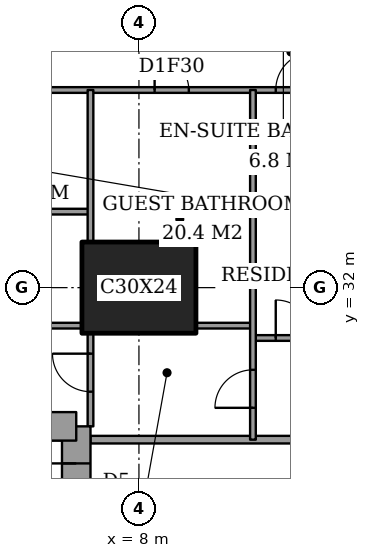
"""IFC4 building model, lengths in metres.
Left out: names, types, materials, properties, quantities, classifications, styles, units other than length and angle.
Written with IfcOpenShell. Run it as: python <this file> out.ifc"""

import sys

from ifc_helpers import new_model, si_unit, direction, frame, frame_2d, origin, origin_2d, place, context, subcontext, project, spatial, rectangle, extrude, element, fill, save


model = new_model("IFC4")
c1 = context("Model", 3, precision=1e-05, world=origin(), true_north=direction((0.0, 1.0)))
c2 = subcontext(c1, "Body", "Model", "MODEL_VIEW")
j1 = project(units=[si_unit("LENGTHUNIT", "METRE"), si_unit("PLANEANGLEUNIT", "RADIAN")], contexts=[c1])
p1 = place(None, origin())
s1 = spatial("IfcSite", under=j1, at=p1, CompositionType="ELEMENT")
p2 = place(p1, origin())
s2 = spatial("IfcBuilding", under=s1, at=p2, CompositionType="ELEMENT")
p3 = place(p2, frame((0.0, 0.0, 128.6)))
s3 = spatial("IfcBuildingStorey", under=s2, at=p3, CompositionType="ELEMENT", Elevation=128.6)
p4 = place(p3, frame((8.0, 32.0, 0.0), z_axis=(0.0, 0.0, 1.0), x_axis=(1.0, 0.0, 0.0)))
e1 = element("IfcColumn", 1, at=p4, inside=s3, PredefinedType="COLUMN", context=c2, shape_type="SweptSolid", body=[
    extrude(rectangle(XDim=3.0, YDim=2.4, at=origin_2d()), origin(), (0.0, 0.0, 1.0), 3.6),
])
p5 = place(p3, frame((6.35, 19.65, 0.0), z_axis=(0.0, 0.0, 1.0), x_axis=(0.0, 1.0, 0.0)))
e2 = element("IfcWall", 2, at=p5, inside=s3, PredefinedType="SHEAR", context=c2, shape_type="SweptSolid", body=[
    extrude(rectangle(XDim=8.7, YDim=0.75, at=frame_2d((4.35, 0.0))), origin(), (0.0, 0.0, 1.0), 3.6),
])
p6 = place(p5, frame((6.725, 0.0, 0.0)))
e3 = element("IfcOpeningElement", 3, at=p6, cuts=e2, PredefinedType="OPENING", context=c2, shape_type="SweptSolid", body=[
    extrude(rectangle(XDim=1.0, YDim=2.1, at=frame_2d((0.5, 1.05))), frame((0.0, 0.385, 0.0), z_axis=(0.0, -1.0, 0.0), x_axis=(1.0, 0.0, 0.0)), (0.0, 0.0, 1.0), 0.77),
])
p7 = place(p3, frame((6.35, 28.35, 0.0), z_axis=(0.0, 0.0, 1.0), x_axis=(-1.0, 0.0, 0.0)))
e4 = element("IfcWall", 4, at=p7, inside=s3, PredefinedType="SHEAR", context=c2, shape_type="SweptSolid", body=[
    extrude(rectangle(XDim=4.45, YDim=0.75, at=frame_2d((2.225, 0.0))), origin(), (0.0, 0.0, 1.0), 3.6),
])
p8 = place(p3, frame((6.725, 28.0, 0.0), z_axis=(0.0, 0.0, 1.0), x_axis=(1.0, 0.0, 0.0)))
e5 = element("IfcWall", 5, at=p8, inside=s3, PredefinedType="PARTITIONING", context=c2, shape_type="SweptSolid", body=[
    extrude(rectangle(XDim=17.275, YDim=0.2, at=frame_2d((8.637, 0.0))), origin(), (0.0, 0.0, 1.0), 3.35),
])
p9 = place(p8, frame((7.175, 0.0, 0.0)))
e6 = element("IfcOpeningElement", 6, at=p9, cuts=e5, PredefinedType="OPENING", context=c2, shape_type="SweptSolid", body=[
    extrude(rectangle(XDim=1.2, YDim=2.4, at=frame_2d((0.6, 1.2))), frame((0.0, 0.11, 0.0), z_axis=(0.0, -1.0, 0.0), x_axis=(1.0, 0.0, 0.0)), (0.0, 0.0, 1.0), 0.22),
])
p10 = place(p3, frame((11.0, 30.675, 0.0), z_axis=(0.0, 0.0, 1.0), x_axis=(1.0, 0.0, 0.0)))
e7 = element("IfcWall", 7, at=p10, inside=s3, PredefinedType="PARTITIONING", context=c2, shape_type="SweptSolid", body=[
    extrude(rectangle(XDim=3.4, YDim=0.15, at=frame_2d((1.7, 0.0))), origin(), (0.0, 0.0, 1.0), 3.35),
])
p11 = place(p10, frame((0.6, 0.0, 0.0)))
e8 = element("IfcOpeningElement", 8, at=p11, cuts=e7, PredefinedType="OPENING", context=c2, shape_type="SweptSolid", body=[
    extrude(rectangle(XDim=1.0, YDim=2.1, at=frame_2d((0.5, 1.05))), frame((0.0, 0.085, 0.0), z_axis=(0.0, -1.0, 0.0), x_axis=(1.0, 0.0, 0.0)), (0.0, 0.0, 1.0), 0.17),
])
p12 = place(p3, frame((1.35, 31.0, 0.0), z_axis=(0.0, 0.0, 1.0), x_axis=(1.0, 0.0, 0.0)))
e9 = element("IfcWall", 9, at=p12, inside=s3, PredefinedType="PARTITIONING", context=c2, shape_type="SweptSolid", body=[
    extrude(rectangle(XDim=5.15, YDim=0.15, at=frame_2d((2.575, 0.0))), origin(), (0.0, 0.0, 1.0), 3.35),
])
p13 = place(p3, frame((9.5, 31.0, 0.0), z_axis=(0.0, 0.0, 1.0), x_axis=(1.0, 0.0, 0.0)))
e10 = element("IfcWall", 10, at=p13, inside=s3, PredefinedType="PARTITIONING", context=c2, shape_type="SweptSolid", body=[
    extrude(rectangle(XDim=1.5, YDim=0.15, at=frame_2d((0.75, 0.0))), origin(), (0.0, 0.0, 1.0), 3.35),
])
p14 = place(p3, frame((4.125, 34.0, 0.0), z_axis=(0.0, 0.0, 1.0), x_axis=(1.0, 0.0, 0.0)))
e11 = element("IfcWall", 11, at=p14, inside=s3, PredefinedType="PARTITIONING", context=c2, shape_type="SweptSolid", body=[
    extrude(rectangle(XDim=2.6, YDim=0.15, at=frame_2d((1.3, 0.0))), origin(), (0.0, 0.0, 1.0), 3.35),
])
p15 = place(p3, frame((-0.45, 37.2, 0.0), z_axis=(0.0, 0.0, 1.0), x_axis=(1.0, 0.0, 0.0)))
e12 = element("IfcWall", 12, at=p15, inside=s3, PredefinedType="PARTITIONING", context=c2, shape_type="SweptSolid", body=[
    extrude(rectangle(XDim=25.011, YDim=0.15, at=frame_2d((12.505, 0.0))), origin(), (0.0, 0.0, 1.0), 3.35),
])
p16 = place(p15, frame((12.05, 0.0, 0.0)))
e13 = element("IfcOpeningElement", 13, at=p16, cuts=e12, PredefinedType="OPENING", context=c2, shape_type="SweptSolid", body=[
    extrude(rectangle(XDim=1.0, YDim=2.1, at=frame_2d((0.5, 1.05))), frame((0.0, 0.085, 0.0), z_axis=(0.0, -1.0, 0.0), x_axis=(1.0, 0.0, 0.0)), (0.0, 0.0, 1.0), 0.17),
])
p17 = place(p15, frame((3.087, 0.0, 0.0)))
e14 = element("IfcOpeningElement", 14, at=p17, cuts=e12, PredefinedType="OPENING", context=c2, shape_type="SweptSolid", body=[
    extrude(rectangle(XDim=1.0, YDim=2.1, at=frame_2d((0.5, 1.05))), frame((0.0, 0.085, 0.0), z_axis=(0.0, -1.0, 0.0), x_axis=(1.0, 0.0, 0.0)), (0.0, 0.0, 1.0), 0.17),
])
p18 = place(p15, frame((8.863, 0.0, 0.0)))
e15 = element("IfcOpeningElement", 15, at=p18, cuts=e12, PredefinedType="OPENING", context=c2, shape_type="SweptSolid", body=[
    extrude(rectangle(XDim=0.9, YDim=2.1, at=frame_2d((0.45, 1.05))), frame((0.0, 0.085, 0.0), z_axis=(0.0, -1.0, 0.0), x_axis=(1.0, 0.0, 0.0)), (0.0, 0.0, 1.0), 0.17),
])
p19 = place(p15, frame((15.55, 0.0, 0.0)))
e16 = element("IfcOpeningElement", 16, at=p19, cuts=e12, PredefinedType="OPENING", context=c2, shape_type="SweptSolid", body=[
    extrude(rectangle(XDim=1.0, YDim=2.1, at=frame_2d((0.5, 1.05))), frame((0.0, 0.085, 0.0), z_axis=(0.0, -1.0, 0.0), x_axis=(1.0, 0.0, 0.0)), (0.0, 0.0, 1.0), 0.17),
])
p20 = place(p15, frame((21.175, 0.0, 0.0)))
e17 = element("IfcOpeningElement", 17, at=p20, cuts=e12, PredefinedType="OPENING", context=c2, shape_type="SweptSolid", body=[
    extrude(rectangle(XDim=1.0, YDim=2.1, at=frame_2d((0.5, 1.05))), frame((0.0, 0.085, 0.0), z_axis=(0.0, -1.0, 0.0), x_axis=(1.0, 0.0, 0.0)), (0.0, 0.0, 1.0), 0.17),
])
p21 = place(p3, frame((6.725, 28.35, 0.0), z_axis=(0.0, 0.0, 1.0), x_axis=(0.0, 1.0, 0.0)))
e18 = element("IfcWall", 18, at=p21, inside=s3, PredefinedType="PARTITIONING", context=c2, shape_type="SweptSolid", body=[
    extrude(rectangle(XDim=2.45, YDim=0.15, at=frame_2d((1.225, 0.0))), origin(), (0.0, 0.0, 1.0), 3.35),
])
p22 = place(p21, frame((0.913, 0.0, 0.0)))
e19 = element("IfcOpeningElement", 19, at=p22, cuts=e18, PredefinedType="OPENING", context=c2, shape_type="SweptSolid", body=[
    extrude(rectangle(XDim=1.0, YDim=2.1, at=frame_2d((0.5, 1.05))), frame((0.0, 0.085, 0.0), z_axis=(0.0, -1.0, 0.0), x_axis=(1.0, 0.0, 0.0)), (0.0, 0.0, 1.0), 0.17),
])
p23 = place(p3, frame((6.725, 33.2, 0.0), z_axis=(0.0, 0.0, 1.0), x_axis=(0.0, 1.0, 0.0)))
e20 = element("IfcWall", 20, at=p23, inside=s3, PredefinedType="PARTITIONING", context=c2, shape_type="SweptSolid", body=[
    extrude(rectangle(XDim=4.0, YDim=0.15, at=frame_2d((2.0, 0.0))), origin(), (0.0, 0.0, 1.0), 3.35),
])
p24 = place(p3, frame((11.0, 28.0, 0.0), z_axis=(0.0, 0.0, 1.0), x_axis=(0.0, 1.0, 0.0)))
e21 = element("IfcWall", 21, at=p24, inside=s3, PredefinedType="PARTITIONING", context=c2, shape_type="SweptSolid", body=[
    extrude(rectangle(XDim=9.2, YDim=0.15, at=frame_2d((4.6, 0.0))), origin(), (0.0, 0.0, 1.0), 3.35),
])
p25 = place(p24, frame((0.837, 0.0, 0.0)))
e22 = element("IfcOpeningElement", 22, at=p25, cuts=e21, PredefinedType="OPENING", context=c2, shape_type="SweptSolid", body=[
    extrude(rectangle(XDim=1.0, YDim=2.1, at=frame_2d((0.5, 1.05))), frame((0.0, 0.085, 0.0), z_axis=(0.0, -1.0, 0.0), x_axis=(1.0, 0.0, 0.0)), (0.0, 0.0, 1.0), 0.17),
])
p26 = place(p16, origin())
e23 = element("IfcDoor", 23, at=p26, inside=s3, OperationType="SINGLE_SWING_LEFT", PredefinedType="DOOR", context=c2, shape_type="SweptSolid", body=[
    extrude(rectangle(XDim=1.0, YDim=2.1, at=frame_2d((0.5, 1.05))), frame((0.0, 0.025, 0.0), z_axis=(0.0, -1.0, 0.0), x_axis=(1.0, 0.0, 0.0)), (0.0, 0.0, 1.0), 0.05),
])
fill(e13, e23)
p27 = place(p22, origin())
e24 = element("IfcDoor", 24, at=p27, inside=s3, OperationType="SINGLE_SWING_LEFT", PredefinedType="DOOR", context=c2, shape_type="SweptSolid", body=[
    extrude(rectangle(XDim=1.0, YDim=2.1, at=frame_2d((0.5, 1.05))), frame((0.0, 0.025, 0.0), z_axis=(0.0, -1.0, 0.0), x_axis=(1.0, 0.0, 0.0)), (0.0, 0.0, 1.0), 0.05),
])
fill(e19, e24)
p28 = place(p18, origin())
e25 = element("IfcDoor", 25, at=p28, inside=s3, OperationType="SINGLE_SWING_RIGHT", PredefinedType="DOOR", context=c2, shape_type="SweptSolid", body=[
    extrude(rectangle(XDim=0.9, YDim=2.1, at=frame_2d((0.45, 1.05))), frame((0.0, 0.025, 0.0), z_axis=(0.0, -1.0, 0.0), x_axis=(1.0, 0.0, 0.0)), (0.0, 0.0, 1.0), 0.05),
])
fill(e15, e25)
p29 = place(p25, origin())
e26 = element("IfcDoor", 26, at=p29, inside=s3, OperationType="SINGLE_SWING_RIGHT", PredefinedType="DOOR", context=c2, shape_type="SweptSolid", body=[
    extrude(rectangle(XDim=1.0, YDim=2.1, at=frame_2d((0.5, 1.05))), frame((0.0, 0.025, 0.0), z_axis=(0.0, -1.0, 0.0), x_axis=(1.0, 0.0, 0.0)), (0.0, 0.0, 1.0), 0.05),
])
fill(e22, e26)
p30 = place(p11, origin())
e27 = element("IfcDoor", 27, at=p30, inside=s3, OperationType="SINGLE_SWING_RIGHT", PredefinedType="DOOR", context=c2, shape_type="SweptSolid", body=[
    extrude(rectangle(XDim=1.0, YDim=2.1, at=frame_2d((0.5, 1.05))), frame((0.0, 0.025, 0.0), z_axis=(0.0, -1.0, 0.0), x_axis=(1.0, 0.0, 0.0)), (0.0, 0.0, 1.0), 0.05),
])
fill(e8, e27)
p31 = place(p6, origin())
e28 = element("IfcDoor", 28, at=p31, inside=s3, OperationType="SINGLE_SWING_LEFT", PredefinedType="DOOR", context=c2, shape_type="SweptSolid", body=[
    extrude(rectangle(XDim=1.0, YDim=2.1, at=frame_2d((0.5, 1.05))), frame((0.0, 0.025, 0.0), z_axis=(0.0, -1.0, 0.0), x_axis=(1.0, 0.0, 0.0)), (0.0, 0.0, 1.0), 0.05),
])
fill(e3, e28)
save(model, sys.argv[1])
